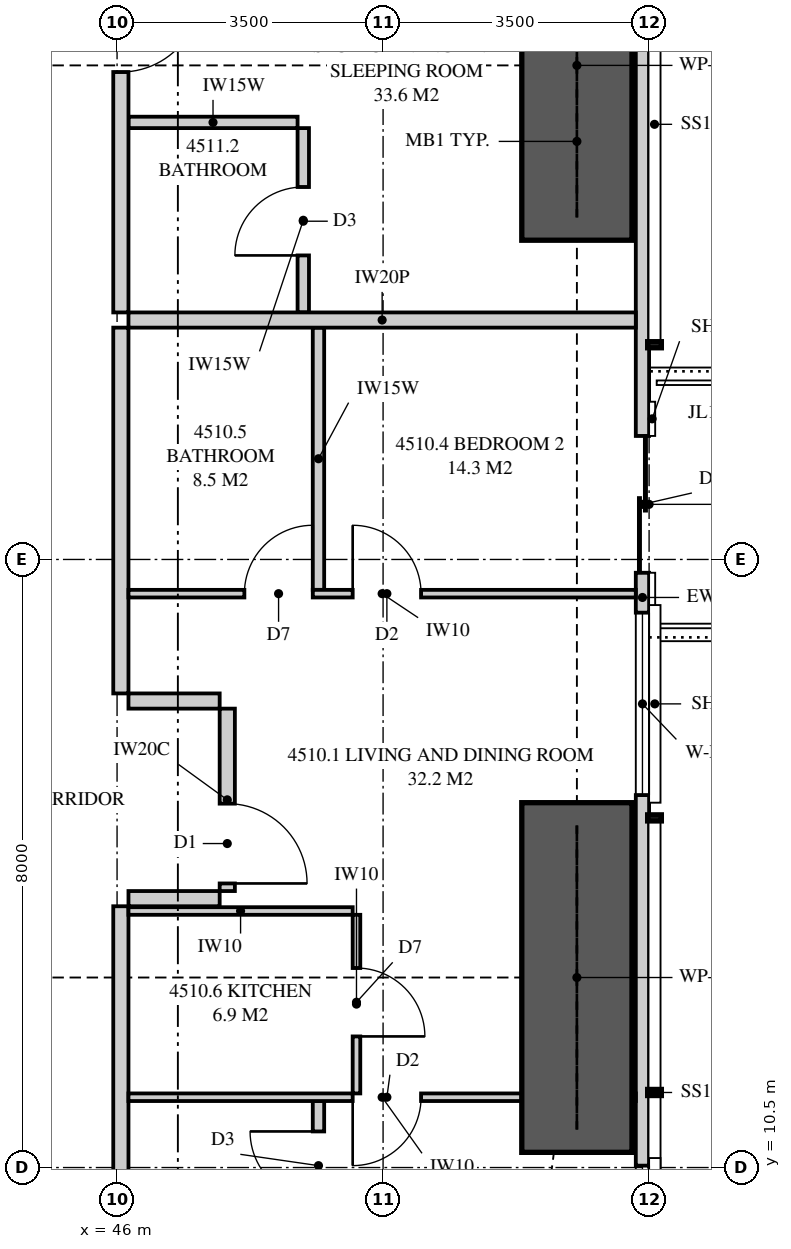
"""IFC4 building model, lengths in metres.
Left out: names, types, materials, properties, quantities, classifications, styles, units other than length and angle.
Written with IfcOpenShell. Run it as: python <this file> out.ifc"""

import sys

from ifc_helpers import new_model, si_unit, direction, frame, frame_2d, origin, place, context, subcontext, project, spatial, polyline, rectangle, outline, extrude, element, fill, save


model = new_model("IFC4")
c1 = context("Model", 3, precision=1e-05, world=origin(), true_north=direction((0.0, 1.0)))
c2 = subcontext(c1, "Body", "Model", "MODEL_VIEW")
j1 = project(units=[si_unit("LENGTHUNIT", "METRE"), si_unit("PLANEANGLEUNIT", "RADIAN")], contexts=[c1])
p1 = place(None, origin())
s1 = spatial("IfcSite", under=j1, at=p1, CompositionType="ELEMENT")
p2 = place(p1, origin())
s2 = spatial("IfcBuilding", under=s1, at=p2, CompositionType="ELEMENT")
p3 = place(p2, frame((0.0, 0.0, 167.75)))
s3 = spatial("IfcBuildingStorey", under=s2, at=p3, CompositionType="ELEMENT", Elevation=167.75)
p4 = place(p3, frame((52.913, 3.051, 0.0), z_axis=(0.0, 0.0, 1.0), x_axis=(0.0, 1.0, 0.0)))
e1 = element("IfcWall", 1, at=p4, inside=s3, PredefinedType="SOLIDWALL", context=c2, shape_type="SweptSolid", body=[
    extrude(outline(polyline([(0.0, 0.0), (29.897, 0.0), (29.897, 3.11), (22.167, 3.11), (22.167, 2.15), (22.074, 2.15), (22.074, 3.11), (21.949, 3.11), (21.949, 2.15), (9.949, 2.15), (9.949, 3.11), (9.847, 3.11), (9.847, 2.15), (9.706, 2.15), (9.706, 3.11), (0.0, 3.11), (0.0, 0.0)])), frame((0.0, 0.087, 0.0), z_axis=(0.0, -1.0, 0.0), x_axis=(1.0, 0.0, 0.0)), (0.0, 0.0, 1.0), 0.175),
])
p5 = place(p4, frame((1.797, 0.0, 0.4)))
e2 = element("IfcOpeningElement", 2, at=p5, cuts=e1, PredefinedType="OPENING", context=c2, shape_type="SweptSolid", body=[
    extrude(rectangle(XDim=1.8, YDim=1.7, at=frame_2d((0.9, 0.85))), frame((0.0, 0.097, 0.0), z_axis=(0.0, -1.0, 0.0), x_axis=(1.0, 0.0, 0.0)), (0.0, 0.0, 1.0), 0.195),
])
p6 = place(p4, frame((5.674, 0.0, 0.4)))
e3 = element("IfcOpeningElement", 3, at=p6, cuts=e1, PredefinedType="OPENING", context=c2, shape_type="SweptSolid", body=[
    extrude(rectangle(XDim=1.8, YDim=1.7, at=frame_2d((0.9, 0.85))), frame((0.0, 0.097, 0.0), z_axis=(0.0, -1.0, 0.0), x_axis=(1.0, 0.0, 0.0)), (0.0, 0.0, 1.0), 0.195),
])
p7 = place(p4, frame((12.349, 0.0, 0.4)))
e4 = element("IfcOpeningElement", 4, at=p7, cuts=e1, PredefinedType="OPENING", context=c2, shape_type="SweptSolid", body=[
    extrude(rectangle(XDim=2.4, YDim=1.7, at=frame_2d((1.2, 0.85))), frame((0.0, 0.097, 0.0), z_axis=(0.0, -1.0, 0.0), x_axis=(1.0, 0.0, 0.0)), (0.0, 0.0, 1.0), 0.195),
])
p8 = place(p4, frame((15.274, 0.0, 0.0)))
e5 = element("IfcOpeningElement", 5, at=p8, cuts=e1, PredefinedType="OPENING", context=c2, shape_type="SweptSolid", body=[
    extrude(rectangle(XDim=1.8, YDim=2.1, at=frame_2d((0.9, 1.05))), frame((0.0, 0.097, 0.0), z_axis=(0.0, -1.0, 0.0), x_axis=(1.0, 0.0, 0.0)), (0.0, 0.0, 1.0), 0.195),
])
p9 = place(p4, frame((24.373, 0.0, 0.4)))
e6 = element("IfcOpeningElement", 6, at=p9, cuts=e1, PredefinedType="OPENING", context=c2, shape_type="SweptSolid", body=[
    extrude(rectangle(XDim=1.2, YDim=1.7, at=frame_2d((0.6, 0.85))), frame((0.0, 0.097, 0.0), z_axis=(0.0, -1.0, 0.0), x_axis=(1.0, 0.0, 0.0)), (0.0, 0.0, 1.0), 0.195),
])
p10 = place(p4, frame((26.801, 0.0, 0.4)))
e7 = element("IfcOpeningElement", 7, at=p10, cuts=e1, PredefinedType="OPENING", context=c2, shape_type="SweptSolid", body=[
    extrude(rectangle(XDim=1.8, YDim=1.7, at=frame_2d((0.9, 0.85))), frame((0.0, 0.097, 0.0), z_axis=(0.0, -1.0, 0.0), x_axis=(1.0, 0.0, 0.0)), (0.0, 0.0, 1.0), 0.195),
])
p11 = place(p3, frame((52.825, 21.65, 0.0), z_axis=(0.0, 0.0, 1.0), x_axis=(-1.0, 0.0, 0.0)))
e8 = element("IfcWall", 8, at=p11, inside=s3, PredefinedType="PARTITIONING", context=c2, shape_type="SweptSolid", body=[
    extrude(outline(polyline([(0.0, 0.0), (6.675, 0.0), (6.675, 3.11), (1.685, 3.11), (1.685, 2.15), (0.0, 2.15), (0.0, 3.11), (0.0, 0.0)])), frame((0.0, 0.1, 0.0), z_axis=(0.0, -1.0, 0.0), x_axis=(1.0, 0.0, 0.0)), (0.0, 0.0, 1.0), 0.2),
])
p12 = place(p3, frame((46.05, 7.925, 0.0), z_axis=(0.0, 0.0, 1.0), x_axis=(0.0, 1.0, 0.0)))
e9 = element("IfcWall", 9, at=p12, inside=s3, PredefinedType="PARTITIONING", context=c2, shape_type="SweptSolid", body=[
    extrude(outline(polyline([(0.0, 0.0), (6.012, 0.0), (6.012, 3.11), (5.412, 3.11), (5.412, 2.541), (4.738, 2.541), (4.738, 3.11), (0.0, 3.11), (0.0, 0.0)])), frame((0.0, 0.1, 0.0), z_axis=(0.0, -1.0, 0.0), x_axis=(1.0, 0.0, 0.0)), (0.0, 0.0, 1.0), 0.2),
])
p13 = place(p3, frame((52.825, 11.425, 0.0), z_axis=(0.0, 0.0, 1.0), x_axis=(-1.0, 0.0, 0.0)))
e10 = element("IfcWall", 10, at=p13, inside=s3, PredefinedType="PARTITIONING", context=c2, shape_type="SweptSolid", body=[
    extrude(outline(polyline([(0.115, 3.11), (0.0, 3.11), (0.0, 0.0), (0.529, 0.0), (0.529, 0.186), (1.021, 0.186), (1.021, 0.0), (6.675, 0.0), (6.675, 3.11), (1.849, 3.11), (1.849, 2.15), (1.021, 2.15), (1.021, 1.965), (0.529, 1.965), (0.529, 2.15), (0.115, 2.15), (0.115, 3.11)])), frame((0.0, 0.05, 0.0), z_axis=(0.0, -1.0, 0.0), x_axis=(1.0, 0.0, 0.0)), (0.0, 0.0, 1.0), 0.1),
])
p14 = place(p13, frame((2.825, 0.0, 0.0)))
e11 = element("IfcOpeningElement", 11, at=p14, cuts=e10, PredefinedType="OPENING", context=c2, shape_type="SweptSolid", body=[
    extrude(rectangle(XDim=0.9, YDim=2.1, at=frame_2d((0.45, 1.05))), frame((0.0, 0.06, 0.0), z_axis=(0.0, -1.0, 0.0), x_axis=(1.0, 0.0, 0.0)), (0.0, 0.0, 1.0), 0.12),
])
p15 = place(p3, frame((52.825, 18.05, 0.0), z_axis=(0.0, 0.0, 1.0), x_axis=(-1.0, 0.0, 0.0)))
e12 = element("IfcWall", 12, at=p15, inside=s3, PredefinedType="PARTITIONING", context=c2, shape_type="SweptSolid", body=[
    extrude(outline(polyline([(0.0, 0.0), (6.675, 0.0), (6.675, 3.11), (1.635, 3.11), (1.635, 2.15), (0.0, 2.15), (0.0, 3.11), (0.0, 0.0)])), frame((0.0, 0.05, 0.0), z_axis=(0.0, -1.0, 0.0), x_axis=(1.0, 0.0, 0.0)), (0.0, 0.0, 1.0), 0.1),
])
p16 = place(p15, frame((2.825, 0.0, 0.0)))
e13 = element("IfcOpeningElement", 13, at=p16, cuts=e12, PredefinedType="OPENING", context=c2, shape_type="SweptSolid", body=[
    extrude(rectangle(XDim=0.9, YDim=2.1, at=frame_2d((0.45, 1.05))), frame((0.0, 0.06, 0.0), z_axis=(0.0, -1.0, 0.0), x_axis=(1.0, 0.0, 0.0)), (0.0, 0.0, 1.0), 0.12),
])
p17 = place(p15, frame((4.25, 0.0, 0.0)))
e14 = element("IfcOpeningElement", 14, at=p17, cuts=e12, PredefinedType="OPENING", context=c2, shape_type="SweptSolid", body=[
    extrude(rectangle(XDim=0.9, YDim=2.1, at=frame_2d((0.45, 1.05))), frame((0.0, 0.06, 0.0), z_axis=(0.0, -1.0, 0.0), x_axis=(1.0, 0.0, 0.0)), (0.0, 0.0, 1.0), 0.12),
])
p18 = place(p3, frame((48.65, 7.925, 0.0), z_axis=(0.0, 0.0, 1.0), x_axis=(0.0, 1.0, 0.0)))
e15 = element("IfcWall", 15, at=p18, inside=s3, PredefinedType="PLUMBINGWALL", context=c2, shape_type="SweptSolid", body=[
    extrude(rectangle(XDim=3.45, YDim=0.15, at=frame_2d((1.725, 0.0))), origin(), (0.0, 0.0, 1.0), 3.11),
])
p19 = place(p18, frame((2.15, 0.0, 0.0)))
e16 = element("IfcOpeningElement", 16, at=p19, cuts=e15, PredefinedType="OPENING", context=c2, shape_type="SweptSolid", body=[
    extrude(rectangle(XDim=0.9, YDim=2.1, at=frame_2d((0.45, 1.05))), frame((0.0, 0.085, 0.0), z_axis=(0.0, -1.0, 0.0), x_axis=(1.0, 0.0, 0.0)), (0.0, 0.0, 1.0), 0.17),
])
p20 = place(p3, frame((48.65, 18.1, 0.0), z_axis=(0.0, 0.0, 1.0), x_axis=(0.0, 1.0, 0.0)))
e17 = element("IfcWall", 17, at=p20, inside=s3, PredefinedType="PLUMBINGWALL", context=c2, shape_type="SweptSolid", body=[
    extrude(rectangle(XDim=3.45, YDim=0.15, at=frame_2d((1.725, 0.0))), origin(), (0.0, 0.0, 1.0), 3.11),
])
p21 = place(p3, frame((49.15, 11.475, 0.0), z_axis=(0.0, 0.0, 1.0), x_axis=(0.0, 1.0, 0.0)))
e18 = element("IfcWall", 18, at=p21, inside=s3, PredefinedType="PARTITIONING", context=c2, shape_type="SweptSolid", body=[
    extrude(outline(polyline([(0.0, 0.0), (2.35, 0.0), (2.35, 3.11), (1.812, 3.11), (1.812, 2.541), (1.238, 2.541), (1.238, 3.11), (0.0, 3.11), (0.0, 0.0)])), frame((0.0, 0.05, 0.0), z_axis=(0.0, -1.0, 0.0), x_axis=(1.0, 0.0, 0.0)), (0.0, 0.0, 1.0), 0.1),
])
p22 = place(p21, frame((0.75, 0.0, 0.0)))
e19 = element("IfcOpeningElement", 19, at=p22, cuts=e18, PredefinedType="OPENING", context=c2, shape_type="SweptSolid", body=[
    extrude(rectangle(XDim=0.9, YDim=2.1, at=frame_2d((0.45, 1.05))), frame((0.0, 0.06, 0.0), z_axis=(0.0, -1.0, 0.0), x_axis=(1.0, 0.0, 0.0)), (0.0, 0.0, 1.0), 0.12),
])
p23 = place(p3, frame((49.1, 13.875, 0.0), z_axis=(0.0, 0.0, 1.0), x_axis=(-1.0, 0.0, 0.0)))
e20 = element("IfcWall", 20, at=p23, inside=s3, PredefinedType="PARTITIONING", context=c2, shape_type="SweptSolid", body=[
    extrude(rectangle(XDim=2.95, YDim=0.1, at=frame_2d((1.475, 0.0))), origin(), (0.0, 0.0, 1.0), 3.11),
])
p24 = place(p3, frame((46.05, 21.75, 0.0), z_axis=(0.0, 0.0, 1.0), x_axis=(0.0, 1.0, 0.0)))
e21 = element("IfcWall", 21, at=p24, inside=s3, PredefinedType="PARTITIONING", context=c2, shape_type="SweptSolid", body=[
    extrude(outline(polyline([(0.0, 0.0), (7.325, 0.0), (7.325, 3.11), (3.587, 3.11), (3.587, 2.541), (2.913, 2.541), (2.913, 3.11), (0.0, 3.11), (0.0, 0.0)])), frame((0.0, 0.1, 0.0), z_axis=(0.0, -1.0, 0.0), x_axis=(1.0, 0.0, 0.0)), (0.0, 0.0, 1.0), 0.2),
])
p25 = place(p24, frame((3.163, 0.0, 0.0)))
e22 = element("IfcOpeningElement", 22, at=p25, cuts=e21, PredefinedType="OPENING", context=c2, shape_type="SweptSolid", body=[
    extrude(rectangle(XDim=1.05, YDim=2.2, at=frame_2d((0.525, 1.1))), frame((0.0, 0.11, 0.0), z_axis=(0.0, -1.0, 0.0), x_axis=(1.0, 0.0, 0.0)), (0.0, 0.0, 1.0), 0.22),
])
p26 = place(p3, frame((48.45, 21.75, 0.0), z_axis=(0.0, 0.0, 1.0), x_axis=(0.0, 1.0, 0.0)))
e23 = element("IfcWall", 23, at=p26, inside=s3, PredefinedType="PLUMBINGWALL", context=c2, shape_type="SweptSolid", body=[
    extrude(rectangle(XDim=2.425, YDim=0.15, at=frame_2d((1.212, 0.0))), origin(), (0.0, 0.0, 1.0), 3.11),
])
p27 = place(p26, frame((0.75, 0.0, 0.0)))
e24 = element("IfcOpeningElement", 24, at=p27, cuts=e23, PredefinedType="OPENING", context=c2, shape_type="SweptSolid", body=[
    extrude(rectangle(XDim=0.9, YDim=2.1, at=frame_2d((0.45, 1.05))), frame((0.0, 0.085, 0.0), z_axis=(0.0, -1.0, 0.0), x_axis=(1.0, 0.0, 0.0)), (0.0, 0.0, 1.0), 0.17),
])
p28 = place(p3, frame((48.375, 24.25, 0.0), z_axis=(0.0, 0.0, 1.0), x_axis=(-1.0, 0.0, 0.0)))
e25 = element("IfcWall", 25, at=p28, inside=s3, PredefinedType="PLUMBINGWALL", context=c2, shape_type="SweptSolid", body=[
    extrude(rectangle(XDim=2.225, YDim=0.15, at=frame_2d((1.113, 0.0))), origin(), (0.0, 0.0, 1.0), 3.11),
])
p29 = place(p3, frame((46.05, 16.738, 0.0), z_axis=(0.0, 0.0, 1.0), x_axis=(0.0, 1.0, 0.0)))
e26 = element("IfcWall", 26, at=p29, inside=s3, PredefinedType="PARTITIONING", context=c2, shape_type="SweptSolid", body=[
    extrude(rectangle(XDim=4.812, YDim=0.2, at=frame_2d((2.406, 0.0))), origin(), (0.0, 0.0, 1.0), 3.11),
])
p30 = place(p3, frame((47.45, 14.137, 0.0), z_axis=(0.0, 0.0, 1.0), x_axis=(0.0, 1.0, 0.0)))
e27 = element("IfcWall", 27, at=p30, inside=s3, PredefinedType="PARTITIONING", context=c2, shape_type="SweptSolid", body=[
    extrude(rectangle(XDim=2.4, YDim=0.2, at=frame_2d((1.2, 0.0))), origin(), (0.0, 0.0, 1.0), 3.11),
])
p31 = place(p30, frame((0.1, 0.0, 0.0)))
e28 = element("IfcOpeningElement", 28, at=p31, cuts=e27, PredefinedType="OPENING", context=c2, shape_type="SweptSolid", body=[
    extrude(rectangle(XDim=1.05, YDim=2.2, at=frame_2d((0.525, 1.1))), frame((0.0, 0.11, 0.0), z_axis=(0.0, -1.0, 0.0), x_axis=(1.0, 0.0, 0.0)), (0.0, 0.0, 1.0), 0.22),
])
for number, where, z_axis, x_axis in (
    (29, (46.15, 14.038, 0.0), (0.0, 0.0, 1.0), (1.0, 0.0, 0.0)),
    (30, (46.15, 16.637, 0.0), (0.0, 0.0, 1.0), (1.0, 0.0, 0.0)),
):
    element("IfcWall", number, at=place(p3, frame(where, z_axis=z_axis, x_axis=x_axis)), inside=s3, PredefinedType="PARTITIONING", context=c2, shape_type="SweptSolid", body=[
        extrude(rectangle(XDim=1.2, YDim=0.2, at=frame_2d((0.6, 0.0))), origin(), (0.0, 0.0, 1.0), 3.11),
    ])
for number, where, z_axis, x_axis in (
    (31, (52.05, 10.7, 0.0), (0.0, 0.0, 1.0), (0.0, 1.0, 0.0)),
    (32, (52.05, 22.7, 0.0), (0.0, 0.0, 1.0), (0.0, 1.0, 0.0)),
):
    element("IfcWall", number, at=place(p3, frame(where, z_axis=z_axis, x_axis=x_axis)), inside=s3, PredefinedType="SHEAR", context=c2, shape_type="SweptSolid", body=[
        extrude(rectangle(XDim=4.6, YDim=1.45, at=frame_2d((2.3, 0.0))), origin(), (0.0, 0.0, 1.0), 3.35),
    ])
p32 = place(p6, origin())
e33 = element("IfcWindow", 33, at=p32, inside=s3, PartitioningType="SINGLE_PANEL", PredefinedType="WINDOW", context=c2, shape_type="SweptSolid", body=[
    extrude(rectangle(XDim=1.8, YDim=1.7, at=frame_2d((0.9, 0.85))), frame((0.0, 0.03, 0.0), z_axis=(0.0, -1.0, 0.0), x_axis=(1.0, 0.0, 0.0)), (0.0, 0.0, 1.0), 0.06),
])
fill(e3, e33)
p33 = place(p7, origin())
e34 = element("IfcWindow", 34, at=p33, inside=s3, PartitioningType="SINGLE_PANEL", PredefinedType="WINDOW", context=c2, shape_type="SweptSolid", body=[
    extrude(rectangle(XDim=2.4, YDim=1.7, at=frame_2d((1.2, 0.85))), frame((0.0, 0.03, 0.0), z_axis=(0.0, -1.0, 0.0), x_axis=(1.0, 0.0, 0.0)), (0.0, 0.0, 1.0), 0.06),
])
fill(e4, e34)
p34 = place(p8, origin())
e35 = element("IfcDoor", 35, at=p34, inside=s3, OperationType="SLIDING_TO_LEFT", PredefinedType="DOOR", context=c2, shape_type="SweptSolid", body=[
    extrude(rectangle(XDim=1.8, YDim=2.1, at=frame_2d((0.9, 1.05))), frame((0.0, 0.025, 0.0), z_axis=(0.0, -1.0, 0.0), x_axis=(1.0, 0.0, 0.0)), (0.0, 0.0, 1.0), 0.05),
])
fill(e5, e35)
p35 = place(p31, frame((1.05, 0.0, 0.0), z_axis=(0.0, 0.0, 1.0), x_axis=(-1.0, 0.0, 0.0)))
e36 = element("IfcDoor", 36, at=p35, inside=s3, OperationType="SINGLE_SWING_RIGHT", PredefinedType="DOOR", context=c2, shape_type="SweptSolid", body=[
    extrude(rectangle(XDim=1.05, YDim=2.2, at=frame_2d((0.525, 1.1))), frame((0.0, 0.025, 0.0), z_axis=(0.0, -1.0, 0.0), x_axis=(1.0, 0.0, 0.0)), (0.0, 0.0, 1.0), 0.05),
])
fill(e28, e36)
p36 = place(p14, origin())
e37 = element("IfcDoor", 37, at=p36, inside=s3, OperationType="SINGLE_SWING_RIGHT", PredefinedType="DOOR", context=c2, shape_type="SweptSolid", body=[
    extrude(rectangle(XDim=0.9, YDim=2.1, at=frame_2d((0.45, 1.05))), frame((0.0, 0.025, 0.0), z_axis=(0.0, -1.0, 0.0), x_axis=(1.0, 0.0, 0.0)), (0.0, 0.0, 1.0), 0.05),
])
fill(e11, e37)
p37 = place(p19, origin())
e38 = element("IfcDoor", 38, at=p37, inside=s3, OperationType="SINGLE_SWING_RIGHT", PredefinedType="DOOR", context=c2, shape_type="SweptSolid", body=[
    extrude(rectangle(XDim=0.9, YDim=2.1, at=frame_2d((0.45, 1.05))), frame((0.0, 0.025, 0.0), z_axis=(0.0, -1.0, 0.0), x_axis=(1.0, 0.0, 0.0)), (0.0, 0.0, 1.0), 0.05),
])
fill(e16, e38)
p38 = place(p16, frame((0.9, 0.0, 0.0), z_axis=(0.0, 0.0, 1.0), x_axis=(-1.0, 0.0, 0.0)))
e39 = element("IfcDoor", 39, at=p38, inside=s3, OperationType="SINGLE_SWING_LEFT", PredefinedType="DOOR", context=c2, shape_type="SweptSolid", body=[
    extrude(rectangle(XDim=0.9, YDim=2.1, at=frame_2d((0.45, 1.05))), frame((0.0, 0.025, 0.0), z_axis=(0.0, -1.0, 0.0), x_axis=(1.0, 0.0, 0.0)), (0.0, 0.0, 1.0), 0.05),
])
fill(e13, e39)
p39 = place(p17, frame((0.9, 0.0, 0.0), z_axis=(0.0, 0.0, 1.0), x_axis=(-1.0, 0.0, 0.0)))
e40 = element("IfcDoor", 40, at=p39, inside=s3, OperationType="SINGLE_SWING_RIGHT", PredefinedType="DOOR", context=c2, shape_type="SweptSolid", body=[
    extrude(rectangle(XDim=0.9, YDim=2.1, at=frame_2d((0.45, 1.05))), frame((0.0, 0.025, 0.0), z_axis=(0.0, -1.0, 0.0), x_axis=(1.0, 0.0, 0.0)), (0.0, 0.0, 1.0), 0.05),
])
fill(e14, e40)
p40 = place(p22, frame((0.9, 0.0, 0.0), z_axis=(0.0, 0.0, 1.0), x_axis=(-1.0, 0.0, 0.0)))
e41 = element("IfcDoor", 41, at=p40, inside=s3, OperationType="SINGLE_SWING_RIGHT", PredefinedType="DOOR", context=c2, shape_type="SweptSolid", body=[
    extrude(rectangle(XDim=0.9, YDim=2.1, at=frame_2d((0.45, 1.05))), frame((0.0, 0.025, 0.0), z_axis=(0.0, -1.0, 0.0), x_axis=(1.0, 0.0, 0.0)), (0.0, 0.0, 1.0), 0.05),
])
fill(e19, e41)
p41 = place(p25, frame((1.05, 0.0, 0.0), z_axis=(0.0, 0.0, 1.0), x_axis=(-1.0, 0.0, 0.0)))
e42 = element("IfcDoor", 42, at=p41, inside=s3, OperationType="SINGLE_SWING_LEFT", PredefinedType="DOOR", context=c2, shape_type="SweptSolid", body=[
    extrude(rectangle(XDim=1.05, YDim=2.2, at=frame_2d((0.525, 1.1))), frame((0.0, 0.025, 0.0), z_axis=(0.0, -1.0, 0.0), x_axis=(1.0, 0.0, 0.0)), (0.0, 0.0, 1.0), 0.05),
])
fill(e22, e42)
p42 = place(p27, origin())
e43 = element("IfcDoor", 43, at=p42, inside=s3, OperationType="SINGLE_SWING_LEFT", PredefinedType="DOOR", context=c2, shape_type="SweptSolid", body=[
    extrude(rectangle(XDim=0.9, YDim=2.1, at=frame_2d((0.45, 1.05))), frame((0.0, 0.025, 0.0), z_axis=(0.0, -1.0, 0.0), x_axis=(1.0, 0.0, 0.0)), (0.0, 0.0, 1.0), 0.05),
])
fill(e24, e43)
save(model, sys.argv[1])
